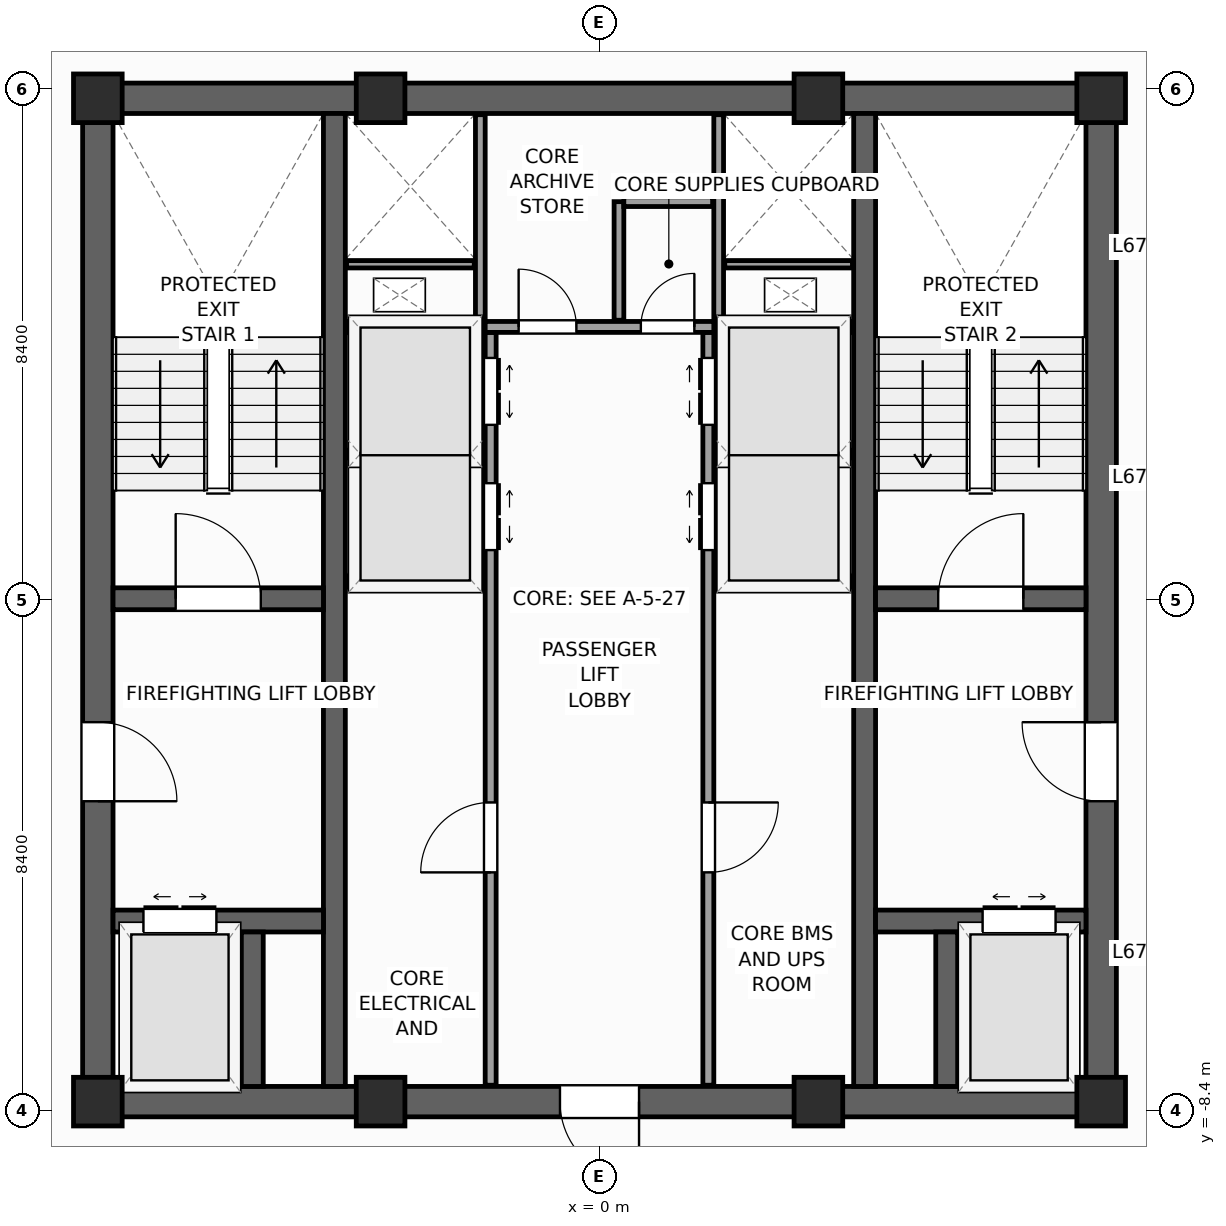
"""IFC4 building model, lengths in metres.
Left out: names, types, materials, properties, quantities, classifications, styles, units other than length and angle.
Written with IfcOpenShell. Run it as: python <this file> out.ifc"""

import sys

from ifc_helpers import new_model, si_unit, direction, frame, frame_2d, origin, origin_2d, place, context, subcontext, project, spatial, rectangle, extrude, source, transform, mapped, element, fill, save


model = new_model("IFC4")
c1 = context("Model", 3, precision=1e-05, world=origin(), true_north=direction((0.0, 1.0)))
c2 = subcontext(c1, "Body", "Model", "MODEL_VIEW")
j1 = project(units=[si_unit("LENGTHUNIT", "METRE"), si_unit("PLANEANGLEUNIT", "RADIAN")], contexts=[c1])
p1 = place(None, origin())
s1 = spatial("IfcSite", under=j1, at=p1, CompositionType="ELEMENT")
p2 = place(p1, origin())
s2 = spatial("IfcBuilding", under=s1, at=p2, CompositionType="ELEMENT")
p3 = place(p2, frame((0.0, 0.0, 276.0)))
s3 = spatial("IfcBuildingStorey", under=s2, at=p3, CompositionType="ELEMENT", Elevation=276.0)
p4 = place(p3, frame((-8.5, -8.25, 0.0), z_axis=(0.0, 0.0, 1.0), x_axis=(1.0, 0.0, 0.0)))
e1 = element("IfcWall", 1, at=p4, inside=s3, PredefinedType="SHEAR", context=c2, shape_type="SweptSolid", body=[
    extrude(rectangle(XDim=17.0, YDim=0.5, at=frame_2d((8.5, 0.0))), origin(), (0.0, 0.0, 1.0), 3.6),
])
p5 = place(p4, frame((7.85, 0.0, 0.0)))
e2 = element("IfcOpeningElement", 2, at=p5, cuts=e1, PredefinedType="OPENING", context=c2, shape_type="SweptSolid", body=[
    extrude(rectangle(XDim=1.3, YDim=2.2, at=frame_2d((0.65, 1.1))), frame((0.0, 0.26, 0.0), z_axis=(0.0, -1.0, 0.0), x_axis=(1.0, 0.0, 0.0)), (0.0, 0.0, 1.0), 0.52),
])
p6 = place(p3, frame((-8.5, 8.25, 0.0), z_axis=(0.0, 0.0, 1.0), x_axis=(1.0, 0.0, 0.0)))
e3 = element("IfcWall", 3, at=p6, inside=s3, PredefinedType="SHEAR", context=c2, shape_type="SweptSolid", body=[
    extrude(rectangle(XDim=17.0, YDim=0.5, at=frame_2d((8.5, 0.0))), origin(), (0.0, 0.0, 1.0), 3.6),
])
p7 = place(p3, frame((-8.25, -8.0, 0.0), z_axis=(0.0, 0.0, 1.0), x_axis=(0.0, 1.0, 0.0)))
e4 = element("IfcWall", 4, at=p7, inside=s3, PredefinedType="SHEAR", context=c2, shape_type="SweptSolid", body=[
    extrude(rectangle(XDim=16.0, YDim=0.5, at=frame_2d((8.0, 0.0))), origin(), (0.0, 0.0, 1.0), 3.6),
])
p8 = place(p7, frame((4.69, 0.0, 0.0)))
e5 = element("IfcOpeningElement", 5, at=p8, cuts=e4, PredefinedType="OPENING", context=c2, shape_type="SweptSolid", body=[
    extrude(rectangle(XDim=1.3, YDim=2.2, at=frame_2d((0.65, 1.1))), frame((0.0, 0.26, 0.0), z_axis=(0.0, -1.0, 0.0), x_axis=(1.0, 0.0, 0.0)), (0.0, 0.0, 1.0), 0.52),
])
p9 = place(p3, frame((8.25, -8.0, 0.0), z_axis=(0.0, 0.0, 1.0), x_axis=(0.0, 1.0, 0.0)))
e6 = element("IfcWall", 6, at=p9, inside=s3, PredefinedType="SHEAR", context=c2, shape_type="SweptSolid", body=[
    extrude(rectangle(XDim=16.0, YDim=0.5, at=frame_2d((8.0, 0.0))), origin(), (0.0, 0.0, 1.0), 3.6),
])
p10 = place(p9, frame((4.69, 0.0, 0.0)))
e7 = element("IfcOpeningElement", 7, at=p10, cuts=e6, PredefinedType="OPENING", context=c2, shape_type="SweptSolid", body=[
    extrude(rectangle(XDim=1.3, YDim=2.2, at=frame_2d((0.65, 1.1))), frame((0.0, 0.26, 0.0), z_axis=(0.0, -1.0, 0.0), x_axis=(1.0, 0.0, 0.0)), (0.0, 0.0, 1.0), 0.52),
])
for number, where, z_axis, x_axis in (
    (8, (-4.36, -8.0, 0.0), (0.0, 0.0, 1.0), (0.0, 1.0, 0.0)),
    (9, (4.36, -8.0, 0.0), (0.0, 0.0, 1.0), (0.0, 1.0, 0.0)),
):
    element("IfcWall", number, at=place(p3, frame(where, z_axis=z_axis, x_axis=x_axis)), inside=s3, PredefinedType="SHEAR", context=c2, shape_type="SweptSolid", body=[
        extrude(rectangle(XDim=16.0, YDim=0.36, at=frame_2d((8.0, 0.0))), origin(), (0.0, 0.0, 1.0), 3.6),
    ])
p11 = place(p3, frame((-8.0, 0.02, 0.0), z_axis=(0.0, 0.0, 1.0), x_axis=(1.0, 0.0, 0.0)))
e10 = element("IfcWall", 10, at=p11, inside=s3, PredefinedType="SHEAR", context=c2, shape_type="SweptSolid", body=[
    extrude(rectangle(XDim=3.46, YDim=0.36, at=frame_2d((1.73, 0.0))), origin(), (0.0, 0.0, 1.0), 3.6),
])
p12 = place(p11, frame((1.03, 0.0, 0.0)))
e11 = element("IfcOpeningElement", 11, at=p12, cuts=e10, PredefinedType="OPENING", context=c2, shape_type="SweptSolid", body=[
    extrude(rectangle(XDim=1.4, YDim=2.2, at=frame_2d((0.7, 1.1))), frame((0.0, 0.19, 0.0), z_axis=(0.0, -1.0, 0.0), x_axis=(1.0, 0.0, 0.0)), (0.0, 0.0, 1.0), 0.38),
])
p13 = place(p3, frame((4.54, 0.02, 0.0), z_axis=(0.0, 0.0, 1.0), x_axis=(1.0, 0.0, 0.0)))
e12 = element("IfcWall", 12, at=p13, inside=s3, PredefinedType="SHEAR", context=c2, shape_type="SweptSolid", body=[
    extrude(rectangle(XDim=3.46, YDim=0.36, at=frame_2d((1.73, 0.0))), origin(), (0.0, 0.0, 1.0), 3.6),
])
p14 = place(p13, frame((1.03, 0.0, 0.0)))
e13 = element("IfcOpeningElement", 13, at=p14, cuts=e12, PredefinedType="OPENING", context=c2, shape_type="SweptSolid", body=[
    extrude(rectangle(XDim=1.4, YDim=2.2, at=frame_2d((0.7, 1.1))), frame((0.0, 0.19, 0.0), z_axis=(0.0, -1.0, 0.0), x_axis=(1.0, 0.0, 0.0)), (0.0, 0.0, 1.0), 0.38),
])
p15 = place(p3, frame((-8.0, -5.28, 0.0), z_axis=(0.0, 0.0, 1.0), x_axis=(1.0, 0.0, 0.0)))
e14 = element("IfcWall", 14, at=p15, inside=s3, PredefinedType="SHEAR", context=c2, shape_type="SweptSolid", body=[
    extrude(rectangle(XDim=3.46, YDim=0.36, at=frame_2d((1.73, 0.0))), origin(), (0.0, 0.0, 1.0), 3.6),
])
p16 = place(p15, frame((0.5, 0.0, 0.0)))
e15 = element("IfcOpeningElement", 15, at=p16, cuts=e14, PredefinedType="OPENING", context=c2, shape_type="SweptSolid", body=[
    extrude(rectangle(XDim=1.2, YDim=2.25, at=frame_2d((0.6, 1.125))), frame((0.0, 0.19, 0.0), z_axis=(0.0, -1.0, 0.0), x_axis=(1.0, 0.0, 0.0)), (0.0, 0.0, 1.0), 0.38),
])
p17 = place(p3, frame((4.54, -5.28, 0.0), z_axis=(0.0, 0.0, 1.0), x_axis=(1.0, 0.0, 0.0)))
e16 = element("IfcWall", 16, at=p17, inside=s3, PredefinedType="SHEAR", context=c2, shape_type="SweptSolid", body=[
    extrude(rectangle(XDim=3.46, YDim=0.36, at=frame_2d((1.73, 0.0))), origin(), (0.0, 0.0, 1.0), 3.6),
])
p18 = place(p17, frame((1.76, 0.0, 0.0)))
e17 = element("IfcOpeningElement", 17, at=p18, cuts=e16, PredefinedType="OPENING", context=c2, shape_type="SweptSolid", body=[
    extrude(rectangle(XDim=1.2, YDim=2.25, at=frame_2d((0.6, 1.125))), frame((0.0, 0.19, 0.0), z_axis=(0.0, -1.0, 0.0), x_axis=(1.0, 0.0, 0.0)), (0.0, 0.0, 1.0), 0.38),
])
for number, where, z_axis, x_axis in (
    (18, (-5.71, -8.0, 0.0), (0.0, 0.0, 1.0), (0.0, 1.0, 0.0)),
    (19, (5.71, -8.0, 0.0), (0.0, 0.0, 1.0), (0.0, 1.0, 0.0)),
):
    element("IfcWall", number, at=place(p3, frame(where, z_axis=z_axis, x_axis=x_axis)), inside=s3, PredefinedType="SHEAR", context=c2, shape_type="SweptSolid", body=[
        extrude(rectangle(XDim=2.54, YDim=0.36, at=frame_2d((1.27, 0.0))), origin(), (0.0, 0.0, 1.0), 3.6),
    ])
m1 = source(origin(), c2, "Body", "SweptSolid", [
    extrude(rectangle(XDim=0.8, YDim=0.8, at=origin_2d()), origin(), (0.0, 0.0, 1.0), 3.6),
])
for number, where, z_axis, x_axis in (
    (20, (-8.25, -8.25, 0.0), (0.0, 0.0, 1.0), (1.0, 0.0, 0.0)),
    (21, (8.25, -8.25, 0.0), (0.0, 0.0, 1.0), (1.0, 0.0, 0.0)),
    (22, (8.25, 8.25, 0.0), (0.0, 0.0, 1.0), (1.0, 0.0, 0.0)),
    (23, (-8.25, 8.25, 0.0), (0.0, 0.0, 1.0), (1.0, 0.0, 0.0)),
    (24, (-3.6, -8.25, 0.0), (0.0, 0.0, 1.0), (1.0, 0.0, 0.0)),
    (25, (3.6, -8.25, 0.0), (0.0, 0.0, 1.0), (1.0, 0.0, 0.0)),
    (26, (-3.6, 8.25, 0.0), (0.0, 0.0, 1.0), (1.0, 0.0, 0.0)),
    (27, (3.6, 8.25, 0.0), (0.0, 0.0, 1.0), (1.0, 0.0, 0.0)),
):
    element("IfcColumn", number, at=place(p3, frame(where, z_axis=z_axis, x_axis=x_axis)), inside=s3, PredefinedType="PILASTER", context=c2, shape_type="MappedRepresentation", body=[
        mapped(m1, transform((0.0, 0.0, 0.0), scale=1.0)),
    ])
p19 = place(p3, frame((-1.79, -7.98, 0.0), z_axis=(0.0, 0.0, 1.0), x_axis=(0.0, 1.0, 0.0)))
e28 = element("IfcWall", 28, at=p19, inside=s3, PredefinedType="PARTITIONING", context=c2, shape_type="SweptSolid", body=[
    extrude(rectangle(XDim=12.38, YDim=0.18, at=frame_2d((6.19, 0.0))), origin(), (0.0, 0.0, 1.0), 3.35),
])
p20 = place(p19, frame((8.8, 0.0, 0.0)))
e29 = element("IfcOpeningElement", 29, at=p20, cuts=e28, PredefinedType="OPENING", context=c2, shape_type="SweptSolid", body=[
    extrude(rectangle(XDim=1.1, YDim=2.2, at=frame_2d((0.55, 1.1))), frame((0.0, 0.1, 0.0), z_axis=(0.0, -1.0, 0.0), x_axis=(1.0, 0.0, 0.0)), (0.0, 0.0, 1.0), 0.2),
])
p21 = place(p19, frame((10.86, 0.0, 0.0)))
e30 = element("IfcOpeningElement", 30, at=p21, cuts=e28, PredefinedType="OPENING", context=c2, shape_type="SweptSolid", body=[
    extrude(rectangle(XDim=1.1, YDim=2.2, at=frame_2d((0.55, 1.1))), frame((0.0, 0.1, 0.0), z_axis=(0.0, -1.0, 0.0), x_axis=(1.0, 0.0, 0.0)), (0.0, 0.0, 1.0), 0.2),
])
p22 = place(p19, frame((3.5, 0.0, 0.0)))
e31 = element("IfcOpeningElement", 31, at=p22, cuts=e28, PredefinedType="OPENING", context=c2, shape_type="SweptSolid", body=[
    extrude(rectangle(XDim=1.15, YDim=2.25, at=frame_2d((0.575, 1.125))), frame((0.0, 0.1, 0.0), z_axis=(0.0, -1.0, 0.0), x_axis=(1.0, 0.0, 0.0)), (0.0, 0.0, 1.0), 0.2),
])
p23 = place(p3, frame((1.79, -7.98, 0.0), z_axis=(0.0, 0.0, 1.0), x_axis=(0.0, 1.0, 0.0)))
e32 = element("IfcWall", 32, at=p23, inside=s3, PredefinedType="PARTITIONING", context=c2, shape_type="SweptSolid", body=[
    extrude(rectangle(XDim=12.38, YDim=0.18, at=frame_2d((6.19, 0.0))), origin(), (0.0, 0.0, 1.0), 3.35),
])
p24 = place(p23, frame((8.8, 0.0, 0.0)))
e33 = element("IfcOpeningElement", 33, at=p24, cuts=e32, PredefinedType="OPENING", context=c2, shape_type="SweptSolid", body=[
    extrude(rectangle(XDim=1.1, YDim=2.2, at=frame_2d((0.55, 1.1))), frame((0.0, 0.1, 0.0), z_axis=(0.0, -1.0, 0.0), x_axis=(1.0, 0.0, 0.0)), (0.0, 0.0, 1.0), 0.2),
])
p25 = place(p23, frame((10.86, 0.0, 0.0)))
e34 = element("IfcOpeningElement", 34, at=p25, cuts=e32, PredefinedType="OPENING", context=c2, shape_type="SweptSolid", body=[
    extrude(rectangle(XDim=1.1, YDim=2.2, at=frame_2d((0.55, 1.1))), frame((0.0, 0.1, 0.0), z_axis=(0.0, -1.0, 0.0), x_axis=(1.0, 0.0, 0.0)), (0.0, 0.0, 1.0), 0.2),
])
p26 = place(p23, frame((3.5, 0.0, 0.0)))
e35 = element("IfcOpeningElement", 35, at=p26, cuts=e32, PredefinedType="OPENING", context=c2, shape_type="SweptSolid", body=[
    extrude(rectangle(XDim=1.15, YDim=2.25, at=frame_2d((0.575, 1.125))), frame((0.0, 0.1, 0.0), z_axis=(0.0, -1.0, 0.0), x_axis=(1.0, 0.0, 0.0)), (0.0, 0.0, 1.0), 0.2),
])
p27 = place(p3, frame((-1.88, 4.49, 0.0), z_axis=(0.0, 0.0, 1.0), x_axis=(1.0, 0.0, 0.0)))
e36 = element("IfcWall", 36, at=p27, inside=s3, PredefinedType="PARTITIONING", context=c2, shape_type="SweptSolid", body=[
    extrude(rectangle(XDim=3.76, YDim=0.18, at=frame_2d((1.88, 0.0))), origin(), (0.0, 0.0, 1.0), 3.35),
])
p28 = place(p27, frame((0.55, 0.0, 0.0)))
e37 = element("IfcOpeningElement", 37, at=p28, cuts=e36, PredefinedType="OPENING", context=c2, shape_type="SweptSolid", body=[
    extrude(rectangle(XDim=0.95, YDim=2.1, at=frame_2d((0.475, 1.05))), frame((0.0, 0.1, 0.0), z_axis=(0.0, -1.0, 0.0), x_axis=(1.0, 0.0, 0.0)), (0.0, 0.0, 1.0), 0.2),
])
p29 = place(p27, frame((2.56, 0.0, 0.0)))
e38 = element("IfcOpeningElement", 38, at=p29, cuts=e36, PredefinedType="OPENING", context=c2, shape_type="SweptSolid", body=[
    extrude(rectangle(XDim=0.88, YDim=2.1, at=frame_2d((0.44, 1.05))), frame((0.0, 0.1, 0.0), z_axis=(0.0, -1.0, 0.0), x_axis=(1.0, 0.0, 0.0)), (0.0, 0.0, 1.0), 0.2),
])
for number, where, z_axis, x_axis in (
    (39, (-4.17, 0.3, 0.0), (0.0, 0.0, 1.0), (1.0, 0.0, 0.0)),
    (40, (1.89, 0.3, 0.0), (0.0, 0.0, 1.0), (1.0, 0.0, 0.0)),
    (41, (-4.17, 4.49, 0.0), (0.0, 0.0, 1.0), (1.0, 0.0, 0.0)),
    (42, (1.89, 4.49, 0.0), (0.0, 0.0, 1.0), (1.0, 0.0, 0.0)),
):
    element("IfcWall", number, at=place(p3, frame(where, z_axis=z_axis, x_axis=x_axis)), inside=s3, PredefinedType="PARTITIONING", context=c2, shape_type="SweptSolid", body=[
        extrude(rectangle(XDim=2.28, YDim=0.18, at=frame_2d((1.14, 0.0))), origin(), (0.0, 0.0, 1.0), 3.35),
    ])
for number, where, z_axis, x_axis in (
    (43, (-4.16, 2.4, 0.0), (0.0, 0.0, 1.0), (1.0, 0.0, 0.0)),
    (44, (1.9, 2.4, 0.0), (0.0, 0.0, 1.0), (1.0, 0.0, 0.0)),
):
    element("IfcWall", number, at=place(p3, frame(where, z_axis=z_axis, x_axis=x_axis)), inside=s3, PredefinedType="PARTITIONING", context=c2, shape_type="SweptSolid", body=[
        extrude(rectangle(XDim=2.26, YDim=0.12, at=frame_2d((1.13, 0.0))), origin(), (0.0, 0.0, 1.0), 3.35),
    ])
for number, where, z_axis, x_axis in (
    (45, (-1.96, 4.58, 0.0), (0.0, 0.0, 1.0), (0.0, 1.0, 0.0)),
    (46, (1.96, 4.58, 0.0), (0.0, 0.0, 1.0), (0.0, 1.0, 0.0)),
):
    element("IfcWall", number, at=place(p3, frame(where, z_axis=z_axis, x_axis=x_axis)), inside=s3, PredefinedType="PARTITIONING", context=c2, shape_type="SweptSolid", body=[
        extrude(rectangle(XDim=3.4, YDim=0.16, at=frame_2d((1.7, 0.0))), origin(), (0.0, 0.0, 1.0), 3.35),
    ])
for number, where, z_axis, x_axis in (
    (47, (-4.16, 5.52, 0.0), (0.0, 0.0, 1.0), (1.0, 0.0, 0.0)),
    (48, (2.06, 5.52, 0.0), (0.0, 0.0, 1.0), (1.0, 0.0, 0.0)),
):
    element("IfcWall", number, at=place(p3, frame(where, z_axis=z_axis, x_axis=x_axis)), inside=s3, PredefinedType="PARTITIONING", context=c2, shape_type="SweptSolid", body=[
        extrude(rectangle(XDim=2.1, YDim=0.12, at=frame_2d((1.05, 0.0))), origin(), (0.0, 0.0, 1.0), 3.35),
    ])
p30 = place(p3, frame((0.32, 4.6, 0.0), z_axis=(0.0, 0.0, 1.0), x_axis=(0.0, 1.0, 0.0)))
e49 = element("IfcWall", 49, at=p30, inside=s3, PredefinedType="PARTITIONING", context=c2, shape_type="SweptSolid", body=[
    extrude(rectangle(XDim=1.95, YDim=0.16, at=frame_2d((0.975, 0.0))), origin(), (0.0, 0.0, 1.0), 3.35),
])
p31 = place(p3, frame((0.4, 6.55, 0.0), z_axis=(0.0, 0.0, 1.0), x_axis=(1.0, 0.0, 0.0)))
e50 = element("IfcWall", 50, at=p31, inside=s3, PredefinedType="PARTITIONING", context=c2, shape_type="SweptSolid", body=[
    extrude(rectangle(XDim=1.46, YDim=0.16, at=frame_2d((0.73, 0.0))), origin(), (0.0, 0.0, 1.0), 3.35),
])
m2 = source(origin(), c2, "Body", "SweptSolid", [
    extrude(rectangle(XDim=1.4, YDim=2.2, at=frame_2d((0.7, 1.1))), frame((0.0, 0.025, 0.0), z_axis=(0.0, -1.0, 0.0), x_axis=(1.0, 0.0, 0.0)), (0.0, 0.0, 1.0), 0.05),
])
p32 = place(p12, origin())
e51 = element("IfcDoor", 51, at=p32, inside=s3, OperationType="SINGLE_SWING_LEFT", PredefinedType="DOOR", context=c2, shape_type="MappedRepresentation", body=[
    mapped(m2, transform((0.0, 0.0, 0.0), scale=1.0)),
])
fill(e11, e51)
p33 = place(p14, origin())
e52 = element("IfcDoor", 52, at=p33, inside=s3, OperationType="SINGLE_SWING_RIGHT", PredefinedType="DOOR", context=c2, shape_type="MappedRepresentation", body=[
    mapped(m2, transform((0.0, 0.0, 0.0), scale=1.0)),
])
fill(e13, e52)
m3 = source(origin(), c2, "Body", "SweptSolid", [
    extrude(rectangle(XDim=1.3, YDim=2.2, at=frame_2d((0.65, 1.1))), frame((0.0, 0.025, 0.0), z_axis=(0.0, -1.0, 0.0), x_axis=(1.0, 0.0, 0.0)), (0.0, 0.0, 1.0), 0.05),
])
p34 = place(p8, frame((1.3, 0.0, 0.0), z_axis=(0.0, 0.0, 1.0), x_axis=(-1.0, 0.0, 0.0)))
e53 = element("IfcDoor", 53, at=p34, inside=s3, OperationType="SINGLE_SWING_LEFT", PredefinedType="DOOR", context=c2, shape_type="MappedRepresentation", body=[
    mapped(m3, transform((0.0, 0.0, 0.0), scale=1.0)),
])
fill(e5, e53)
p35 = place(p10, origin())
e54 = element("IfcDoor", 54, at=p35, inside=s3, OperationType="SINGLE_SWING_RIGHT", PredefinedType="DOOR", context=c2, shape_type="MappedRepresentation", body=[
    mapped(m3, transform((0.0, 0.0, 0.0), scale=1.0)),
])
fill(e7, e54)
p36 = place(p5, frame((1.3, 0.0, 0.0), z_axis=(0.0, 0.0, 1.0), x_axis=(-1.0, 0.0, 0.0)))
e55 = element("IfcDoor", 55, at=p36, inside=s3, OperationType="SINGLE_SWING_RIGHT", PredefinedType="DOOR", context=c2, shape_type="MappedRepresentation", body=[
    mapped(m3, transform((0.0, 0.0, 0.0), scale=1.0)),
])
fill(e2, e55)
m4 = source(origin(), c2, "Body", "SweptSolid", [
    extrude(rectangle(XDim=1.2, YDim=2.25, at=frame_2d((0.6, 1.125))), frame((0.0, 0.025, 0.0), z_axis=(0.0, -1.0, 0.0), x_axis=(1.0, 0.0, 0.0)), (0.0, 0.0, 1.0), 0.05),
])
p37 = place(p16, origin())
e56 = element("IfcDoor", 56, at=p37, inside=s3, OperationType="DOUBLE_DOOR_SLIDING", PredefinedType="DOOR", context=c2, shape_type="MappedRepresentation", body=[
    mapped(m4, transform((0.0, 0.0, 0.0), scale=1.0)),
])
fill(e15, e56)
p38 = place(p18, origin())
e57 = element("IfcDoor", 57, at=p38, inside=s3, OperationType="DOUBLE_DOOR_SLIDING", PredefinedType="DOOR", context=c2, shape_type="MappedRepresentation", body=[
    mapped(m4, transform((0.0, 0.0, 0.0), scale=1.0)),
])
fill(e17, e57)
m5 = source(origin(), c2, "Body", "SweptSolid", [
    extrude(rectangle(XDim=1.1, YDim=2.2, at=frame_2d((0.55, 1.1))), frame((0.0, 0.025, 0.0), z_axis=(0.0, -1.0, 0.0), x_axis=(1.0, 0.0, 0.0)), (0.0, 0.0, 1.0), 0.05),
])
p39 = place(p20, frame((1.1, 0.0, 0.0), z_axis=(0.0, 0.0, 1.0), x_axis=(-1.0, 0.0, 0.0)))
e58 = element("IfcDoor", 58, at=p39, inside=s3, OperationType="DOUBLE_DOOR_SLIDING", PredefinedType="DOOR", context=c2, shape_type="MappedRepresentation", body=[
    mapped(m5, transform((0.0, 0.0, 0.0), scale=1.0)),
])
fill(e29, e58)
p40 = place(p21, frame((1.1, 0.0, 0.0), z_axis=(0.0, 0.0, 1.0), x_axis=(-1.0, 0.0, 0.0)))
e59 = element("IfcDoor", 59, at=p40, inside=s3, OperationType="DOUBLE_DOOR_SLIDING", PredefinedType="DOOR", context=c2, shape_type="MappedRepresentation", body=[
    mapped(m5, transform((0.0, 0.0, 0.0), scale=1.0)),
])
fill(e30, e59)
p41 = place(p24, origin())
e60 = element("IfcDoor", 60, at=p41, inside=s3, OperationType="DOUBLE_DOOR_SLIDING", PredefinedType="DOOR", context=c2, shape_type="MappedRepresentation", body=[
    mapped(m5, transform((0.0, 0.0, 0.0), scale=1.0)),
])
fill(e33, e60)
p42 = place(p25, origin())
e61 = element("IfcDoor", 61, at=p42, inside=s3, OperationType="DOUBLE_DOOR_SLIDING", PredefinedType="DOOR", context=c2, shape_type="MappedRepresentation", body=[
    mapped(m5, transform((0.0, 0.0, 0.0), scale=1.0)),
])
fill(e34, e61)
m6 = source(origin(), c2, "Body", "SweptSolid", [
    extrude(rectangle(XDim=1.15, YDim=2.25, at=frame_2d((0.575, 1.125))), frame((0.0, 0.025, 0.0), z_axis=(0.0, -1.0, 0.0), x_axis=(1.0, 0.0, 0.0)), (0.0, 0.0, 1.0), 0.05),
])
p43 = place(p22, origin())
e62 = element("IfcDoor", 62, at=p43, inside=s3, OperationType="SINGLE_SWING_LEFT", PredefinedType="DOOR", context=c2, shape_type="MappedRepresentation", body=[
    mapped(m6, transform((0.0, 0.0, 0.0), scale=1.0)),
])
fill(e31, e62)
p44 = place(p26, frame((1.15, 0.0, 0.0), z_axis=(0.0, 0.0, 1.0), x_axis=(-1.0, 0.0, 0.0)))
e63 = element("IfcDoor", 63, at=p44, inside=s3, OperationType="SINGLE_SWING_RIGHT", PredefinedType="DOOR", context=c2, shape_type="MappedRepresentation", body=[
    mapped(m6, transform((0.0, 0.0, 0.0), scale=1.0)),
])
fill(e35, e63)
m7 = source(origin(), c2, "Body", "SweptSolid", [
    extrude(rectangle(XDim=0.95, YDim=2.1, at=frame_2d((0.475, 1.05))), frame((0.0, 0.025, 0.0), z_axis=(0.0, -1.0, 0.0), x_axis=(1.0, 0.0, 0.0)), (0.0, 0.0, 1.0), 0.05),
])
p45 = place(p28, origin())
e64 = element("IfcDoor", 64, at=p45, inside=s3, OperationType="SINGLE_SWING_LEFT", PredefinedType="DOOR", context=c2, shape_type="MappedRepresentation", body=[
    mapped(m7, transform((0.0, 0.0, 0.0), scale=1.0)),
])
fill(e37, e64)
m8 = source(origin(), c2, "Body", "SweptSolid", [
    extrude(rectangle(XDim=0.88, YDim=2.1, at=frame_2d((0.44, 1.05))), frame((0.0, 0.025, 0.0), z_axis=(0.0, -1.0, 0.0), x_axis=(1.0, 0.0, 0.0)), (0.0, 0.0, 1.0), 0.05),
])
p46 = place(p29, origin())
e65 = element("IfcDoor", 65, at=p46, inside=s3, OperationType="SINGLE_SWING_RIGHT", PredefinedType="DOOR", context=c2, shape_type="MappedRepresentation", body=[
    mapped(m8, transform((0.0, 0.0, 0.0), scale=1.0)),
])
fill(e38, e65)
save(model, sys.argv[1])
